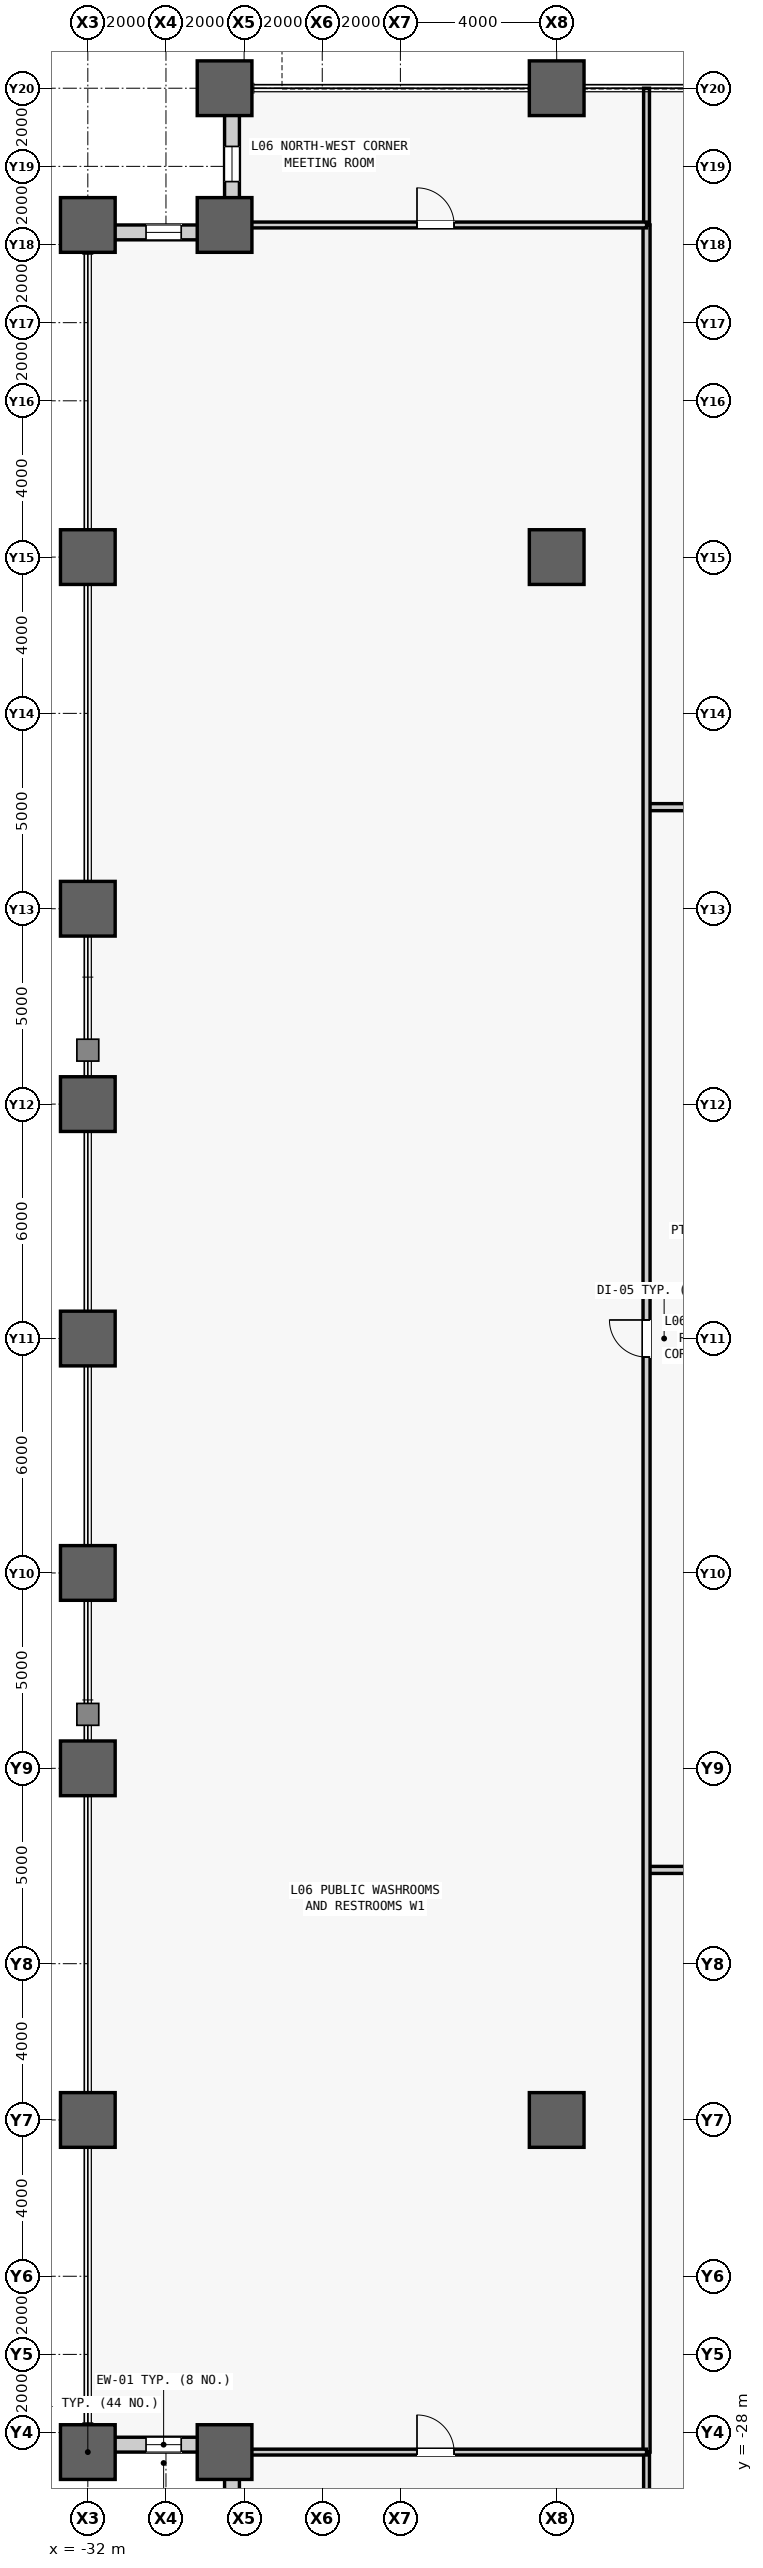
"""IFC4 building model, lengths in metres.
Left out: names, types, materials, properties, quantities, classifications, styles, units other than length and angle.
Written with IfcOpenShell. Run it as: python <this file> out.ifc"""

import sys

from ifc_helpers import new_model, si_unit, direction, frame, frame_2d, origin, origin_2d, place, context, subcontext, project, spatial, rectangle, hollow_rectangle, extrude, source, transform, mapped, element, fill, save


model = new_model("IFC4")
c1 = context("Model", 3, precision=1e-05, world=origin(), true_north=direction((0.0, 1.0)))
c2 = subcontext(c1, "Body", "Model", "MODEL_VIEW")
j1 = project(units=[si_unit("LENGTHUNIT", "METRE"), si_unit("PLANEANGLEUNIT", "RADIAN")], contexts=[c1])
p1 = place(None, origin())
s1 = spatial("IfcSite", under=j1, at=p1, CompositionType="ELEMENT")
p2 = place(p1, origin())
s2 = spatial("IfcBuilding", under=s1, at=p2, CompositionType="ELEMENT")
p3 = place(p2, frame((0.0, 0.0, 32.6)))
s3 = spatial("IfcBuildingStorey", under=s2, at=p3, CompositionType="ELEMENT", Elevation=32.6)
m1 = source(origin(), c2, "Body", "SweptSolid", [
    extrude(hollow_rectangle(XDim=1.4, YDim=1.4, WallThickness=0.075, at=origin_2d()), origin(), (0.0, 0.0, 1.0), 4.2),
])
for number, where, z_axis, x_axis in (
    (1, (-32.0, -28.5, 0.0), (0.0, 0.0, 1.0), (1.0, 0.0, 0.0)),
    (2, (-32.0, -20.0, 0.0), (0.0, 0.0, 1.0), (1.0, 0.0, 0.0)),
    (3, (-32.0, -11.0, 0.0), (0.0, 0.0, 1.0), (1.0, 0.0, 0.0)),
    (4, (-32.0, -6.0, 0.0), (0.0, 0.0, 1.0), (1.0, 0.0, 0.0)),
    (5, (-32.0, 0.0, 0.0), (0.0, 0.0, 1.0), (1.0, 0.0, 0.0)),
    (6, (-32.0, 6.0, 0.0), (0.0, 0.0, 1.0), (1.0, 0.0, 0.0)),
    (7, (-32.0, 11.0, 0.0), (0.0, 0.0, 1.0), (1.0, 0.0, 0.0)),
    (8, (-32.0, 20.0, 0.0), (0.0, 0.0, 1.0), (1.0, 0.0, 0.0)),
    (9, (-32.0, 28.5, 0.0), (0.0, 0.0, 1.0), (1.0, 0.0, 0.0)),
    (10, (-28.5, -28.5, 0.0), (0.0, 0.0, 1.0), (1.0, 0.0, 0.0)),
    (11, (-28.5, 28.5, 0.0), (0.0, 0.0, 1.0), (1.0, 0.0, 0.0)),
    (12, (-28.5, 32.0, 0.0), (0.0, 0.0, 1.0), (1.0, 0.0, 0.0)),
    (13, (-20.0, -20.0, 0.0), (0.0, 0.0, 1.0), (1.0, 0.0, 0.0)),
    (14, (-20.0, 20.0, 0.0), (0.0, 0.0, 1.0), (1.0, 0.0, 0.0)),
    (15, (-20.0, 32.0, 0.0), (0.0, 0.0, 1.0), (1.0, 0.0, 0.0)),
):
    element("IfcColumn", number, at=place(p3, frame(where, z_axis=z_axis, x_axis=x_axis)), inside=s3, PredefinedType="COLUMN", context=c2, shape_type="MappedRepresentation", body=[
        mapped(m1, transform((0.0, 0.0, 0.0), scale=1.0)),
    ])
m2 = source(origin(), c2, "Body", "SweptSolid", [
    extrude(rectangle(XDim=3.12, YDim=0.38, at=frame_2d((1.56, 0.0))), origin(), (0.0, 0.0, 1.0), 3.245),
])
p4 = place(p3, frame((-28.5, -28.31, 0.0), z_axis=(0.0, 0.0, 1.0), x_axis=(-1.0, 0.0, 0.0)))
e16 = element("IfcWall", 16, at=p4, inside=s3, PredefinedType="STANDARD", context=c2, shape_type="MappedRepresentation", body=[
    mapped(m2, transform((0.0, 0.0, 0.0), scale=1.0)),
])
m3 = source(origin(), c2, "Body", "SweptSolid", [
    extrude(rectangle(XDim=0.9, YDim=2.4, at=frame_2d((0.45, 1.2))), frame((0.0, 0.2, 0.0), z_axis=(0.0, -1.0, 0.0), x_axis=(1.0, 0.0, 0.0)), (0.0, 0.0, 1.0), 0.4),
])
p5 = place(p4, frame((1.11, 0.0, 0.5)))
e17 = element("IfcOpeningElement", 17, at=p5, cuts=e16, PredefinedType="OPENING", context=c2, shape_type="MappedRepresentation", body=[
    mapped(m3, transform((0.0, 0.0, 0.0), scale=1.0)),
])
p6 = place(p3, frame((-28.31, -31.62, 0.0), z_axis=(0.0, 0.0, 1.0), x_axis=(0.0, 1.0, 0.0)))
e18 = element("IfcWall", 18, at=p6, inside=s3, PredefinedType="STANDARD", context=c2, shape_type="MappedRepresentation", body=[
    mapped(m2, transform((0.0, 0.0, 0.0), scale=1.0)),
])
p7 = place(p6, frame((1.11, 0.0, 0.5)))
e19 = element("IfcOpeningElement", 19, at=p7, cuts=e18, PredefinedType="OPENING", context=c2, shape_type="MappedRepresentation", body=[
    mapped(m3, transform((0.0, 0.0, 0.0), scale=1.0)),
])
p8 = place(p3, frame((-28.31, 28.5, 0.0), z_axis=(0.0, 0.0, 1.0), x_axis=(0.0, 1.0, 0.0)))
e20 = element("IfcWall", 20, at=p8, inside=s3, PredefinedType="STANDARD", context=c2, shape_type="MappedRepresentation", body=[
    mapped(m2, transform((0.0, 0.0, 0.0), scale=1.0)),
])
p9 = place(p8, frame((1.11, 0.0, 0.5)))
e21 = element("IfcOpeningElement", 21, at=p9, cuts=e20, PredefinedType="OPENING", context=c2, shape_type="MappedRepresentation", body=[
    mapped(m3, transform((0.0, 0.0, 0.0), scale=1.0)),
])
p10 = place(p3, frame((-28.5, 28.31, 0.0), z_axis=(0.0, 0.0, 1.0), x_axis=(-1.0, 0.0, 0.0)))
e22 = element("IfcWall", 22, at=p10, inside=s3, PredefinedType="STANDARD", context=c2, shape_type="MappedRepresentation", body=[
    mapped(m2, transform((0.0, 0.0, 0.0), scale=1.0)),
])
p11 = place(p10, frame((1.11, 0.0, 0.5)))
e23 = element("IfcOpeningElement", 23, at=p11, cuts=e22, PredefinedType="OPENING", context=c2, shape_type="MappedRepresentation", body=[
    mapped(m3, transform((0.0, 0.0, 0.0), scale=1.0)),
])
m4 = source(origin(), c2, "Body", "SweptSolid", [
    extrude(rectangle(XDim=36.25, YDim=0.18, at=frame_2d((18.125, 0.0))), origin(), (0.0, 0.0, 1.0), 3.94),
])
p12 = place(p3, frame((-17.7, -13.6, 0.0), z_axis=(0.0, 0.0, 1.0), x_axis=(1.0, 0.0, 0.0)))
e24 = element("IfcWall", 24, at=p12, inside=s3, PredefinedType="PARTITIONING", context=c2, shape_type="MappedRepresentation", body=[
    mapped(m4, transform((0.0, 0.0, 0.0), scale=1.0)),
])
m5 = source(origin(), c2, "Body", "SweptSolid", [
    extrude(rectangle(XDim=1.05, YDim=2.2, at=frame_2d((0.525, 1.1))), frame((0.0, 0.1, 0.0), z_axis=(0.0, -1.0, 0.0), x_axis=(1.0, 0.0, 0.0)), (0.0, 0.0, 1.0), 0.2),
])
p13 = place(p12, frame((17.175, 0.0, 0.0)))
e25 = element("IfcOpeningElement", 25, at=p13, cuts=e24, PredefinedType="OPENING", context=c2, shape_type="MappedRepresentation", body=[
    mapped(m5, transform((0.0, 0.0, 0.0), scale=1.0)),
])
p14 = place(p3, frame((-17.7, 13.6, 0.0), z_axis=(0.0, 0.0, 1.0), x_axis=(1.0, 0.0, 0.0)))
e26 = element("IfcWall", 26, at=p14, inside=s3, PredefinedType="PARTITIONING", context=c2, shape_type="MappedRepresentation", body=[
    mapped(m4, transform((0.0, 0.0, 0.0), scale=1.0)),
])
p15 = place(p14, frame((5.113, 0.0, 0.0)))
e27 = element("IfcOpeningElement", 27, at=p15, cuts=e26, PredefinedType="OPENING", context=c2, shape_type="MappedRepresentation", body=[
    mapped(m5, transform((0.0, 0.0, 0.0), scale=1.0)),
])
p16 = place(p14, frame((12.525, 0.0, 0.0)))
e28 = element("IfcOpeningElement", 28, at=p16, cuts=e26, PredefinedType="OPENING", context=c2, shape_type="MappedRepresentation", body=[
    mapped(m5, transform((0.0, 0.0, 0.0), scale=1.0)),
])
p17 = place(p14, frame((22.675, 0.0, 0.0)))
e29 = element("IfcOpeningElement", 29, at=p17, cuts=e26, PredefinedType="OPENING", context=c2, shape_type="MappedRepresentation", body=[
    mapped(m5, transform((0.0, 0.0, 0.0), scale=1.0)),
])
p18 = place(p14, frame((29.663, 0.0, 0.0)))
e30 = element("IfcOpeningElement", 30, at=p18, cuts=e26, PredefinedType="OPENING", context=c2, shape_type="MappedRepresentation", body=[
    mapped(m5, transform((0.0, 0.0, 0.0), scale=1.0)),
])
m6 = source(origin(), c2, "Body", "SweptSolid", [
    extrude(rectangle(XDim=3.5, YDim=0.15, at=frame_2d((1.75, 0.0))), origin(), (0.0, 0.0, 1.0), 3.94),
])
for number, where, z_axis, x_axis in (
    (31, (-17.7, -32.0, 0.0), (0.0, 0.0, 1.0), (0.0, 1.0, 0.0)),
    (32, (-17.7, 28.5, 0.0), (0.0, 0.0, 1.0), (0.0, 1.0, 0.0)),
):
    element("IfcWall", number, at=place(p3, frame(where, z_axis=z_axis, x_axis=x_axis)), inside=s3, PredefinedType="PARTITIONING", context=c2, shape_type="MappedRepresentation", body=[
        mapped(m6, transform((0.0, 0.0, 0.0), scale=1.0)),
    ])
m7 = source(origin(), c2, "Body", "SweptSolid", [
    extrude(rectangle(XDim=57.0, YDim=0.18, at=frame_2d((28.5, 0.0))), origin(), (0.0, 0.0, 1.0), 3.94),
])
p19 = place(p3, frame((-17.7, -28.5, 0.0), z_axis=(0.0, 0.0, 1.0), x_axis=(0.0, 1.0, 0.0)))
e33 = element("IfcWall", 33, at=p19, inside=s3, PredefinedType="PARTITIONING", context=c2, shape_type="MappedRepresentation", body=[
    mapped(m7, transform((0.0, 0.0, 0.0), scale=1.0)),
])
m8 = source(origin(), c2, "Body", "SweptSolid", [
    extrude(rectangle(XDim=0.95, YDim=2.15, at=frame_2d((0.475, 1.075))), frame((0.0, 0.1, 0.0), z_axis=(0.0, -1.0, 0.0), x_axis=(1.0, 0.0, 0.0)), (0.0, 0.0, 1.0), 0.2),
])
p20 = place(p19, frame((28.025, 0.0, 0.0)))
e34 = element("IfcOpeningElement", 34, at=p20, cuts=e33, PredefinedType="OPENING", context=c2, shape_type="MappedRepresentation", body=[
    mapped(m8, transform((0.0, 0.0, 0.0), scale=1.0)),
])
m9 = source(origin(), c2, "Body", "SweptSolid", [
    extrude(rectangle(XDim=10.8, YDim=0.15, at=frame_2d((5.4, 0.0))), origin(), (0.0, 0.0, 1.0), 3.94),
])
p21 = place(p3, frame((-28.5, -28.5, 0.0), z_axis=(0.0, 0.0, 1.0), x_axis=(1.0, 0.0, 0.0)))
e35 = element("IfcWall", 35, at=p21, inside=s3, PredefinedType="PARTITIONING", context=c2, shape_type="MappedRepresentation", body=[
    mapped(m9, transform((0.0, 0.0, 0.0), scale=1.0)),
])
m10 = source(origin(), c2, "Body", "SweptSolid", [
    extrude(rectangle(XDim=0.95, YDim=2.15, at=frame_2d((0.475, 1.075))), frame((0.0, 0.085, 0.0), z_axis=(0.0, -1.0, 0.0), x_axis=(1.0, 0.0, 0.0)), (0.0, 0.0, 1.0), 0.17),
])
p22 = place(p21, frame((4.925, 0.0, 0.0)))
e36 = element("IfcOpeningElement", 36, at=p22, cuts=e35, PredefinedType="OPENING", context=c2, shape_type="MappedRepresentation", body=[
    mapped(m10, transform((0.0, 0.0, 0.0), scale=1.0)),
])
p23 = place(p3, frame((-28.5, 28.5, 0.0), z_axis=(0.0, 0.0, 1.0), x_axis=(1.0, 0.0, 0.0)))
e37 = element("IfcWall", 37, at=p23, inside=s3, PredefinedType="PARTITIONING", context=c2, shape_type="MappedRepresentation", body=[
    mapped(m9, transform((0.0, 0.0, 0.0), scale=1.0)),
])
p24 = place(p23, frame((4.925, 0.0, 0.0)))
e38 = element("IfcOpeningElement", 38, at=p24, cuts=e37, PredefinedType="OPENING", context=c2, shape_type="MappedRepresentation", body=[
    mapped(m10, transform((0.0, 0.0, 0.0), scale=1.0)),
])
m11 = source(origin(), c2, "Body", "SweptSolid", [
    extrude(rectangle(XDim=0.9, YDim=2.4, at=frame_2d((0.45, 1.2))), frame((0.0, 0.03, 0.0), z_axis=(0.0, -1.0, 0.0), x_axis=(1.0, 0.0, 0.0)), (0.0, 0.0, 1.0), 0.06),
])
p25 = place(p5, origin())
e39 = element("IfcWindow", 39, at=p25, inside=s3, PartitioningType="SINGLE_PANEL", PredefinedType="WINDOW", context=c2, shape_type="MappedRepresentation", body=[
    mapped(m11, transform((0.0, 0.0, 0.0), scale=1.0)),
])
fill(e17, e39)
p26 = place(p9, origin())
e40 = element("IfcWindow", 40, at=p26, inside=s3, PartitioningType="SINGLE_PANEL", PredefinedType="WINDOW", context=c2, shape_type="MappedRepresentation", body=[
    mapped(m11, transform((0.0, 0.0, 0.0), scale=1.0)),
])
fill(e21, e40)
p27 = place(p11, origin())
e41 = element("IfcWindow", 41, at=p27, inside=s3, PartitioningType="SINGLE_PANEL", PredefinedType="WINDOW", context=c2, shape_type="MappedRepresentation", body=[
    mapped(m11, transform((0.0, 0.0, 0.0), scale=1.0)),
])
fill(e23, e41)
m12 = source(origin(), c2, "Body", "SweptSolid", [
    extrude(rectangle(XDim=0.95, YDim=2.15, at=frame_2d((0.475, 1.075))), frame((0.0, 0.025, 0.0), z_axis=(0.0, -1.0, 0.0), x_axis=(1.0, 0.0, 0.0)), (0.0, 0.0, 1.0), 0.05),
])
p28 = place(p20, origin())
e42 = element("IfcDoor", 42, at=p28, inside=s3, OperationType="SINGLE_SWING_RIGHT", PredefinedType="DOOR", context=c2, shape_type="MappedRepresentation", body=[
    mapped(m12, transform((0.0, 0.0, 0.0), scale=1.0)),
])
fill(e34, e42)
p29 = place(p22, origin())
e43 = element("IfcDoor", 43, at=p29, inside=s3, OperationType="SINGLE_SWING_LEFT", PredefinedType="DOOR", context=c2, shape_type="MappedRepresentation", body=[
    mapped(m12, transform((0.0, 0.0, 0.0), scale=1.0)),
])
fill(e36, e43)
p30 = place(p24, origin())
e44 = element("IfcDoor", 44, at=p30, inside=s3, OperationType="SINGLE_SWING_LEFT", PredefinedType="DOOR", context=c2, shape_type="MappedRepresentation", body=[
    mapped(m12, transform((0.0, 0.0, 0.0), scale=1.0)),
])
fill(e38, e44)
save(model, sys.argv[1])
